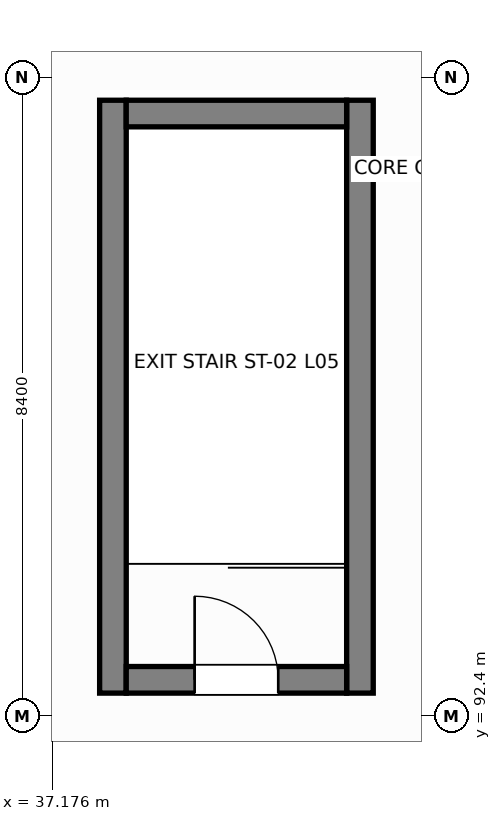
"""IFC4 building model, lengths in metres.
Left out: names, types, materials, properties, quantities, classifications, styles, units other than length and angle.
Written with IfcOpenShell. Run it as: python <this file> out.ifc"""

import sys

from ifc_helpers import new_model, si_unit, direction, frame, frame_2d, origin, place, context, subcontext, project, spatial, rectangle, extrude, element, fill, save


model = new_model("IFC4")
c1 = context("Model", 3, precision=1e-05, world=origin(), true_north=direction((0.0, 1.0)))
c2 = subcontext(c1, "Body", "Model", "MODEL_VIEW")
j1 = project(units=[si_unit("LENGTHUNIT", "METRE"), si_unit("PLANEANGLEUNIT", "RADIAN")], contexts=[c1])
p1 = place(None, origin())
s1 = spatial("IfcSite", under=j1, at=p1, CompositionType="ELEMENT")
p2 = place(p1, origin())
s2 = spatial("IfcBuilding", under=s1, at=p2, CompositionType="ELEMENT")
p3 = place(p2, frame((0.0, 0.0, 21.6)))
s3 = spatial("IfcBuildingStorey", under=s2, at=p3, CompositionType="ELEMENT", Elevation=21.6)
for number, where, z_axis, x_axis in (
    (1, (37.975, 92.7, 0.0), (0.0, 0.0, 1.0), (0.0, 1.0, 0.0)),
    (2, (41.225, 92.7, 0.0), (0.0, 0.0, 1.0), (0.0, 1.0, 0.0)),
):
    element("IfcWall", number, at=place(p3, frame(where, z_axis=z_axis, x_axis=x_axis)), inside=s3, PredefinedType="SHEAR", context=c2, shape_type="SweptSolid", body=[
        extrude(rectangle(XDim=7.8, YDim=0.35, at=frame_2d((3.9, 0.0))), origin(), (0.0, 0.0, 1.0), 4.0),
    ])
p4 = place(p3, frame((38.15, 100.325, 0.0), z_axis=(0.0, 0.0, 1.0), x_axis=(1.0, 0.0, 0.0)))
e3 = element("IfcWall", 3, at=p4, inside=s3, PredefinedType="SHEAR", context=c2, shape_type="SweptSolid", body=[
    extrude(rectangle(XDim=2.9, YDim=0.35, at=frame_2d((1.45, 0.0))), origin(), (0.0, 0.0, 1.0), 4.0),
])
p5 = place(p3, frame((38.15, 92.875, 0.0), z_axis=(0.0, 0.0, 1.0), x_axis=(1.0, 0.0, 0.0)))
e4 = element("IfcWall", 4, at=p5, inside=s3, PredefinedType="SHEAR", context=c2, shape_type="SweptSolid", body=[
    extrude(rectangle(XDim=2.9, YDim=0.35, at=frame_2d((1.45, 0.0))), origin(), (0.0, 0.0, 1.0), 4.0),
])
p6 = place(p5, frame((0.9, 0.0, 0.0)))
e5 = element("IfcOpeningElement", 5, at=p6, cuts=e4, PredefinedType="OPENING", context=c2, shape_type="SweptSolid", body=[
    extrude(rectangle(XDim=1.1, YDim=2.15, at=frame_2d((0.55, 1.075))), frame((0.0, 0.185, 0.0), z_axis=(0.0, -1.0, 0.0), x_axis=(1.0, 0.0, 0.0)), (0.0, 0.0, 1.0), 0.37),
])
p7 = place(p6, origin())
e6 = element("IfcDoor", 6, at=p7, inside=s3, OperationType="SINGLE_SWING_LEFT", PredefinedType="DOOR", context=c2, shape_type="SweptSolid", body=[
    extrude(rectangle(XDim=1.1, YDim=2.15, at=frame_2d((0.55, 1.075))), frame((0.0, 0.025, 0.0), z_axis=(0.0, -1.0, 0.0), x_axis=(1.0, 0.0, 0.0)), (0.0, 0.0, 1.0), 0.05),
])
fill(e5, e6)
save(model, sys.argv[1])
